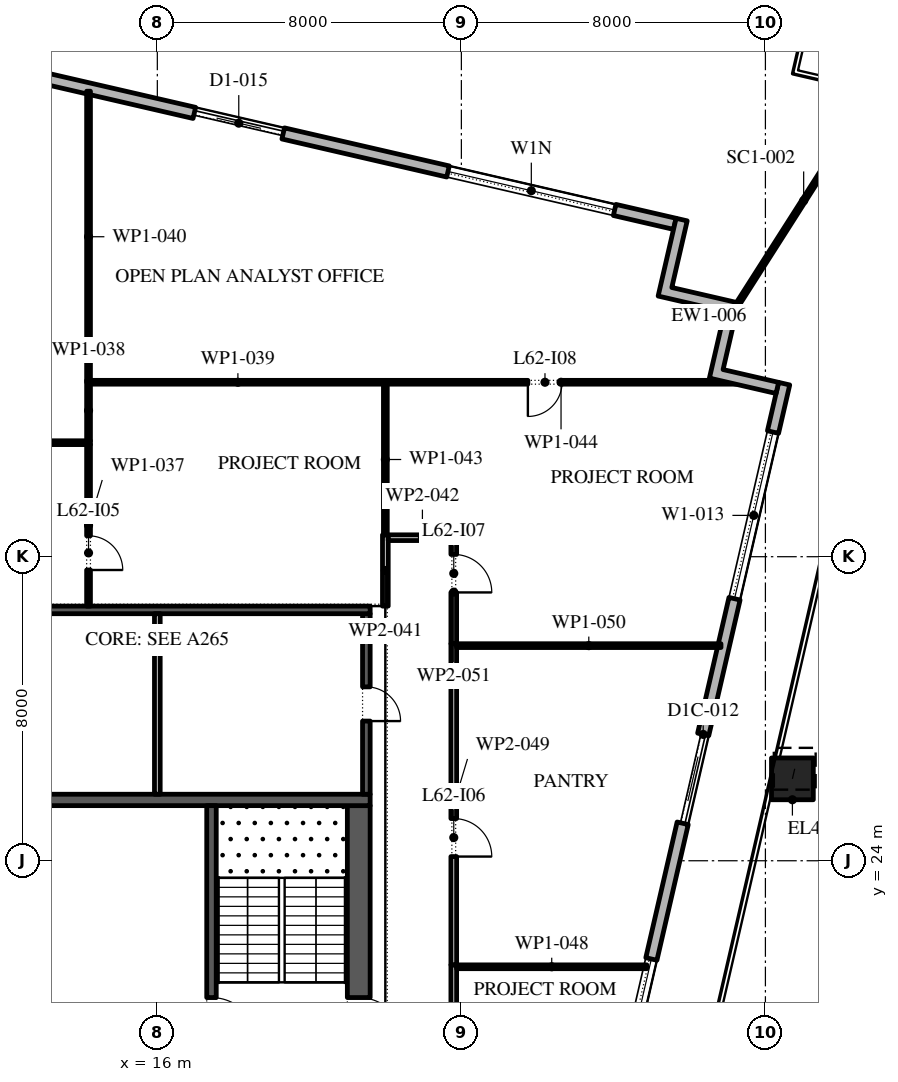
"""IFC4 building model, lengths in metres.
Left out: names, types, materials, properties, quantities, classifications, styles, units other than length and angle.
Written with IfcOpenShell. Run it as: python <this file> out.ifc"""

import sys

from ifc_helpers import new_model, si_unit, direction, frame, frame_2d, origin, origin_2d, place, context, subcontext, project, spatial, polyline, rectangle, outline, extrude, element, fill, save


model = new_model("IFC4")
c1 = context("Model", 3, precision=1e-05, world=origin(), true_north=direction((0.0, 1.0)))
c2 = subcontext(c1, "Body", "Model", "MODEL_VIEW")
j1 = project(units=[si_unit("LENGTHUNIT", "METRE"), si_unit("PLANEANGLEUNIT", "RADIAN")], contexts=[c1])
p1 = place(None, origin())
s1 = spatial("IfcSite", under=j1, at=p1, CompositionType="ELEMENT")
p2 = place(p1, origin())
s2 = spatial("IfcBuilding", under=s1, at=p2, CompositionType="ELEMENT")
p3 = place(p2, frame((0.0, 0.0, 285.0)))
s3 = spatial("IfcBuildingStorey", under=s2, at=p3, CompositionType="ELEMENT", Elevation=285.0)
p4 = place(p3, frame((32.71, 26.155, 0.0), z_axis=(0.014617783326, 0.063169706518, 0.99789574034), x_axis=(-0.974255315496, 0.225447511024, 0.0)))
e1 = element("IfcColumn", 1, at=p4, inside=s3, PredefinedType="COLUMN", context=c2, shape_type="SweptSolid", body=[
    extrude(rectangle(XDim=1.1, YDim=1.1, at=origin_2d()), origin(), (0.0, 0.0, 1.0), 4.209),
])
p5 = place(p3, frame((21.359, -11.678, 0.0), z_axis=(0.0, 0.0, 1.0), x_axis=(0.224949198343, 0.974370493275, 0.0)))
e2 = element("IfcWall", 2, at=p5, inside=s3, PredefinedType="STANDARD", context=c2, shape_type="SweptSolid", body=[
    extrude(rectangle(XDim=49.5, YDim=0.3, at=frame_2d((24.75, 0.0))), origin(), (0.0, 0.0, 1.0), 4.0),
])
p6 = place(p5, frame((1.157, 0.0, 0.45)))
e3 = element("IfcOpeningElement", 3, at=p6, cuts=e2, PredefinedType="OPENING", context=c2, shape_type="SweptSolid", body=[
    extrude(rectangle(XDim=4.5, YDim=3.05, at=frame_2d((2.25, 1.525))), frame((0.0, 0.16, 0.0), z_axis=(0.0, -1.0, 0.0), x_axis=(1.0, 0.0, 0.0)), (0.0, 0.0, 1.0), 0.32),
])
p7 = place(p5, frame((8.121, 0.0, 0.45)))
e4 = element("IfcOpeningElement", 4, at=p7, cuts=e2, PredefinedType="OPENING", context=c2, shape_type="SweptSolid", body=[
    extrude(rectangle(XDim=4.5, YDim=3.05, at=frame_2d((2.25, 1.525))), frame((0.0, 0.16, 0.0), z_axis=(0.0, -1.0, 0.0), x_axis=(1.0, 0.0, 0.0)), (0.0, 0.0, 1.0), 0.32),
])
p8 = place(p5, frame((15.236, 0.0, 0.45)))
e5 = element("IfcOpeningElement", 5, at=p8, cuts=e2, PredefinedType="OPENING", context=c2, shape_type="SweptSolid", body=[
    extrude(rectangle(XDim=4.5, YDim=3.05, at=frame_2d((2.25, 1.525))), frame((0.0, 0.16, 0.0), z_axis=(0.0, -1.0, 0.0), x_axis=(1.0, 0.0, 0.0)), (0.0, 0.0, 1.0), 0.32),
])
p9 = place(p5, frame((22.35, 0.0, 0.45)))
e6 = element("IfcOpeningElement", 6, at=p9, cuts=e2, PredefinedType="OPENING", context=c2, shape_type="SweptSolid", body=[
    extrude(rectangle(XDim=4.5, YDim=3.05, at=frame_2d((2.25, 1.525))), frame((0.0, 0.16, 0.0), z_axis=(0.0, -1.0, 0.0), x_axis=(1.0, 0.0, 0.0)), (0.0, 0.0, 1.0), 0.32),
])
p10 = place(p5, frame((29.464, 0.0, 0.45)))
e7 = element("IfcOpeningElement", 7, at=p10, cuts=e2, PredefinedType="OPENING", context=c2, shape_type="SweptSolid", body=[
    extrude(rectangle(XDim=4.5, YDim=2.95, at=frame_2d((2.25, 1.475))), frame((0.0, 0.16, 0.0), z_axis=(0.0, -1.0, 0.0), x_axis=(1.0, 0.0, 0.0)), (0.0, 0.0, 1.0), 0.32),
])
p11 = place(p5, frame((37.628, 0.0, 0.0)))
e8 = element("IfcOpeningElement", 8, at=p11, cuts=e2, PredefinedType="OPENING", context=c2, shape_type="SweptSolid", body=[
    extrude(rectangle(XDim=2.4, YDim=3.325, at=frame_2d((1.2, 1.663))), frame((0.0, 0.16, 0.0), z_axis=(0.0, -1.0, 0.0), x_axis=(1.0, 0.0, 0.0)), (0.0, 0.0, 1.0), 0.32),
])
p12 = place(p5, frame((43.693, 0.0, 0.45)))
e9 = element("IfcOpeningElement", 9, at=p12, cuts=e2, PredefinedType="OPENING", context=c2, shape_type="SweptSolid", body=[
    extrude(rectangle(XDim=4.5, YDim=3.05, at=frame_2d((2.25, 1.525))), frame((0.0, 0.16, 0.0), z_axis=(0.0, -1.0, 0.0), x_axis=(1.0, 0.0, 0.0)), (0.0, 0.0, 1.0), 0.32),
])
p13 = place(p3, frame((29.616, 40.758, 0.0), z_axis=(0.0, 0.0, 1.0), x_axis=(-0.974370532314, 0.224949029246, 0.0)))
e10 = element("IfcWall", 10, at=p13, inside=s3, PredefinedType="STANDARD", context=c2, shape_type="SweptSolid", body=[
    extrude(rectangle(XDim=48.0, YDim=0.3, at=frame_2d((24.0, 0.0))), origin(), (0.0, 0.0, 1.0), 4.0),
])
p14 = place(p13, frame((1.625, 0.0, 0.45)))
e11 = element("IfcOpeningElement", 11, at=p14, cuts=e10, PredefinedType="OPENING", context=c2, shape_type="SweptSolid", body=[
    extrude(rectangle(XDim=4.5, YDim=2.525, at=frame_2d((2.25, 1.262))), frame((0.0, 0.16, 0.0), z_axis=(0.0, -1.0, 0.0), x_axis=(1.0, 0.0, 0.0)), (0.0, 0.0, 1.0), 0.32),
])
p15 = place(p13, frame((10.575, 0.0, 0.0)))
e12 = element("IfcOpeningElement", 12, at=p15, cuts=e10, PredefinedType="OPENING", context=c2, shape_type="SweptSolid", body=[
    extrude(rectangle(XDim=2.4, YDim=3.5, at=frame_2d((1.2, 1.75))), frame((0.0, 0.16, 0.0), z_axis=(0.0, -1.0, 0.0), x_axis=(1.0, 0.0, 0.0)), (0.0, 0.0, 1.0), 0.32),
])
p16 = place(p13, frame((17.575, 0.0, 0.45)))
e13 = element("IfcOpeningElement", 13, at=p16, cuts=e10, PredefinedType="OPENING", context=c2, shape_type="SweptSolid", body=[
    extrude(rectangle(XDim=4.5, YDim=2.45, at=frame_2d((2.25, 1.225))), frame((0.0, 0.16, 0.0), z_axis=(0.0, -1.0, 0.0), x_axis=(1.0, 0.0, 0.0)), (0.0, 0.0, 1.0), 0.32),
])
p17 = place(p13, frame((25.625, 0.0, 0.45)))
e14 = element("IfcOpeningElement", 14, at=p17, cuts=e10, PredefinedType="OPENING", context=c2, shape_type="SweptSolid", body=[
    extrude(rectangle(XDim=4.5, YDim=2.45, at=frame_2d((2.25, 1.225))), frame((0.0, 0.16, 0.0), z_axis=(0.0, -1.0, 0.0), x_axis=(1.0, 0.0, 0.0)), (0.0, 0.0, 1.0), 0.32),
])
p18 = place(p13, frame((33.675, 0.0, 0.45)))
e15 = element("IfcOpeningElement", 15, at=p18, cuts=e10, PredefinedType="OPENING", context=c2, shape_type="SweptSolid", body=[
    extrude(rectangle(XDim=4.5, YDim=2.45, at=frame_2d((2.25, 1.225))), frame((0.0, 0.16, 0.0), z_axis=(0.0, -1.0, 0.0), x_axis=(1.0, 0.0, 0.0)), (0.0, 0.0, 1.0), 0.32),
])
p19 = place(p13, frame((42.775, 0.0, 0.0)))
e16 = element("IfcOpeningElement", 16, at=p19, cuts=e10, PredefinedType="OPENING", context=c2, shape_type="SweptSolid", body=[
    extrude(rectangle(XDim=2.4, YDim=3.5, at=frame_2d((1.2, 1.75))), frame((0.0, 0.16, 0.0), z_axis=(0.0, -1.0, 0.0), x_axis=(1.0, 0.0, 0.0)), (0.0, 0.0, 1.0), 0.32),
])
p20 = place(p3, origin())
e17 = element("IfcWall", 17, at=p20, inside=s3, PredefinedType="STANDARD", context=c2, shape_type="SweptSolid", body=[
    extrude(outline(polyline([(30.931, 38.453), (29.177, 38.858), (29.65, 40.905), (29.942, 40.837), (29.537, 39.083), (31.291, 38.678), (30.886, 36.924), (32.348, 36.587), (32.28, 36.295), (30.526, 36.699), (30.931, 38.453)])), origin(), (0.0, 0.0, 1.0), 4.0),
])
p21 = place(p3, frame((31.291, 38.678, -0.05), z_axis=(0.0, 0.0, 1.0), x_axis=(0.537850870221, 0.843039999883, 0.0)))
e18 = element("IfcWall", 18, at=p21, inside=s3, PredefinedType="STANDARD", context=c2, shape_type="SweptSolid", body=[
    extrude(rectangle(XDim=6.379, YDim=0.1, at=frame_2d((3.189, 0.0))), origin(), (0.0, 0.0, 1.0), 4.05),
])
p22 = place(p3, frame((21.3, -2.45, 0.0), z_axis=(0.0, 0.0, 1.0), x_axis=(0.0, 1.0, 0.0)))
e19 = element("IfcWall", 19, at=p22, inside=s3, PredefinedType="SHEAR", context=c2, shape_type="SweptSolid", body=[
    extrude(rectangle(XDim=27.9, YDim=0.6, at=frame_2d((13.95, 0.0))), origin(), (0.0, 0.0, 1.0), 4.0),
])
p23 = place(p22, frame((5.05, 0.0, 0.0)))
e20 = element("IfcOpeningElement", 20, at=p23, cuts=e19, PredefinedType="OPENING", context=c2, shape_type="SweptSolid", body=[
    extrude(rectangle(XDim=1.2, YDim=2.1, at=frame_2d((0.6, 1.05))), frame((0.0, 0.31, 0.0), z_axis=(0.0, -1.0, 0.0), x_axis=(1.0, 0.0, 0.0)), (0.0, 0.0, 1.0), 0.62),
])
p24 = place(p22, frame((21.65, 0.0, 0.0)))
e21 = element("IfcOpeningElement", 21, at=p24, cuts=e19, PredefinedType="OPENING", context=c2, shape_type="SweptSolid", body=[
    extrude(rectangle(XDim=1.2, YDim=2.1, at=frame_2d((0.6, 1.05))), frame((0.0, 0.31, 0.0), z_axis=(0.0, -1.0, 0.0), x_axis=(1.0, 0.0, 0.0)), (0.0, 0.0, 1.0), 0.62),
])
p25 = place(p3, frame((10.4, 25.6, 0.0), z_axis=(0.0, 0.0, 1.0), x_axis=(1.0, 0.0, 0.0)))
e22 = element("IfcWall", 22, at=p25, inside=s3, PredefinedType="SHEAR", context=c2, shape_type="SweptSolid", body=[
    extrude(rectangle(XDim=11.2, YDim=0.3, at=frame_2d((5.6, 0.0))), origin(), (0.0, 0.0, 1.0), 4.0),
])
p26 = place(p3, frame((17.425, 19.15, 0.0), z_axis=(0.0, 0.0, 1.0), x_axis=(0.0, 1.0, 0.0)))
e23 = element("IfcWall", 23, at=p26, inside=s3, PredefinedType="SHEAR", context=c2, shape_type="SweptSolid", body=[
    extrude(rectangle(XDim=6.3, YDim=0.25, at=frame_2d((3.15, 0.0))), origin(), (0.0, 0.0, 1.0), 4.0),
])
p27 = place(p26, frame((0.05, 0.0, 0.0)))
e24 = element("IfcOpeningElement", 24, at=p27, cuts=e23, PredefinedType="OPENING", context=c2, shape_type="SweptSolid", body=[
    extrude(rectangle(XDim=1.2, YDim=2.1, at=frame_2d((0.6, 1.05))), frame((0.0, 0.135, 0.0), z_axis=(0.0, -1.0, 0.0), x_axis=(1.0, 0.0, 0.0)), (0.0, 0.0, 1.0), 0.27),
])
p28 = place(p3, frame((21.5, 25.75, 0.0), z_axis=(0.0, 0.0, 1.0), x_axis=(0.0, 1.0, 0.0)))
e25 = element("IfcWall", 25, at=p28, inside=s3, PredefinedType="SHEAR", context=c2, shape_type="SweptSolid", body=[
    extrude(rectangle(XDim=4.75, YDim=0.2, at=frame_2d((2.375, 0.0))), origin(), (0.0, 0.0, 1.0), 4.0),
])
p29 = place(p28, frame((1.925, 0.0, 0.0)))
e26 = element("IfcOpeningElement", 26, at=p29, cuts=e25, PredefinedType="OPENING", context=c2, shape_type="SweptSolid", body=[
    extrude(rectangle(XDim=0.9, YDim=2.1, at=frame_2d((0.45, 1.05))), frame((0.0, 0.11, 0.0), z_axis=(0.0, -1.0, 0.0), x_axis=(1.0, 0.0, 0.0)), (0.0, 0.0, 1.0), 0.22),
])
p30 = place(p3, frame((10.4, 30.6, 0.0), z_axis=(0.0, 0.0, 1.0), x_axis=(1.0, 0.0, 0.0)))
e27 = element("IfcWall", 27, at=p30, inside=s3, PredefinedType="SHEAR", context=c2, shape_type="SweptSolid", body=[
    extrude(rectangle(XDim=11.2, YDim=0.2, at=frame_2d((5.6, 0.0))), origin(), (0.0, 0.0, 1.0), 4.0),
])
p31 = place(p3, frame((16.0, 25.75, 0.0), z_axis=(0.0, 0.0, 1.0), x_axis=(0.0, 1.0, 0.0)))
e28 = element("IfcWall", 28, at=p31, inside=s3, PredefinedType="PARTITIONING", context=c2, shape_type="SweptSolid", body=[
    extrude(rectangle(XDim=4.75, YDim=0.15, at=frame_2d((2.375, 0.0))), origin(), (0.0, 0.0, 1.0), 4.0),
])
p32 = place(p3, frame((14.24, 35.0, 0.0), z_axis=(0.0, 0.0, 1.0), x_axis=(-1.0, 0.0, 0.0)))
e29 = element("IfcWall", 29, at=p32, inside=s3, PredefinedType="PARTITIONING", context=c2, shape_type="SweptSolid", body=[
    extrude(rectangle(XDim=13.175, YDim=0.1, at=frame_2d((6.587, 0.0))), origin(), (0.0, 0.0, 1.0), 4.0),
])
p33 = place(p3, frame((14.19, 34.95, 0.0), z_axis=(0.0, 0.0, 1.0), x_axis=(0.0, -1.0, 0.0)))
e30 = element("IfcWall", 30, at=p33, inside=s3, PredefinedType="PARTITIONING", context=c2, shape_type="SweptSolid", body=[
    extrude(rectangle(XDim=4.25, YDim=0.1, at=frame_2d((2.125, 0.0))), origin(), (0.0, 0.0, 1.0), 4.0),
])
p34 = place(p33, frame((2.4, 0.0, 0.0)))
e31 = element("IfcOpeningElement", 31, at=p34, cuts=e30, PredefinedType="OPENING", context=c2, shape_type="SweptSolid", body=[
    extrude(rectangle(XDim=0.9, YDim=2.1, at=frame_2d((0.45, 1.05))), frame((0.0, 0.06, 0.0), z_axis=(0.0, -1.0, 0.0), x_axis=(1.0, 0.0, 0.0)), (0.0, 0.0, 1.0), 0.12),
])
p35 = place(p3, frame((14.19, 36.64, 0.0), z_axis=(0.0, 0.0, 1.0), x_axis=(0.0, -1.0, 0.0)))
e32 = element("IfcWall", 32, at=p35, inside=s3, PredefinedType="PARTITIONING", context=c2, shape_type="SweptSolid", body=[
    extrude(rectangle(XDim=1.59, YDim=0.1, at=frame_2d((0.795, 0.0))), origin(), (0.0, 0.0, 1.0), 4.0),
])
p36 = place(p3, frame((14.24, 36.59, 0.0), z_axis=(0.0, 0.0, 1.0), x_axis=(1.0, 0.0, 0.0)))
e33 = element("IfcWall", 33, at=p36, inside=s3, PredefinedType="PARTITIONING", context=c2, shape_type="SweptSolid", body=[
    extrude(rectangle(XDim=7.76, YDim=0.1, at=frame_2d((3.88, 0.0))), origin(), (0.0, 0.0, 1.0), 4.0),
])
p37 = place(p3, frame((14.19, 44.248, 0.0), z_axis=(0.0, 0.0, 1.0), x_axis=(0.0, -1.0, 0.0)))
e34 = element("IfcWall", 34, at=p37, inside=s3, PredefinedType="PARTITIONING", context=c2, shape_type="SweptSolid", body=[
    extrude(rectangle(XDim=7.658, YDim=0.1, at=frame_2d((3.829, 0.0))), origin(), (0.0, 0.0, 1.0), 4.0),
])
p38 = place(p3, frame((22.0, 30.7, 0.0), z_axis=(0.0, 0.0, 1.0), x_axis=(0.0, 1.0, 0.0)))
e35 = element("IfcWall", 35, at=p38, inside=s3, PredefinedType="PARTITIONING", context=c2, shape_type="SweptSolid", body=[
    extrude(rectangle(XDim=1.875, YDim=0.15, at=frame_2d((0.938, 0.0))), origin(), (0.0, 0.0, 1.0), 4.0),
])
p39 = place(p3, frame((22.075, 32.5, 0.0), z_axis=(0.0, 0.0, 1.0), x_axis=(1.0, 0.0, 0.0)))
e36 = element("IfcWall", 36, at=p39, inside=s3, PredefinedType="PARTITIONING", context=c2, shape_type="SweptSolid", body=[
    extrude(rectangle(XDim=1.8, YDim=0.15, at=frame_2d((0.9, 0.0))), origin(), (0.0, 0.0, 1.0), 4.0),
])
p40 = place(p3, frame((22.0, 36.54, 0.0), z_axis=(0.0, 0.0, 1.0), x_axis=(0.0, -1.0, 0.0)))
e37 = element("IfcWall", 37, at=p40, inside=s3, PredefinedType="PARTITIONING", context=c2, shape_type="SweptSolid", body=[
    extrude(rectangle(XDim=3.965, YDim=0.1, at=frame_2d((1.982, 0.0))), origin(), (0.0, 0.0, 1.0), 4.0),
])
p41 = place(p3, frame((22.0, 36.59, 0.0), z_axis=(0.0, 0.0, 1.0), x_axis=(1.0, 0.0, 0.0)))
e38 = element("IfcWall", 38, at=p41, inside=s3, PredefinedType="PARTITIONING", context=c2, shape_type="SweptSolid", body=[
    extrude(rectangle(XDim=9.245, YDim=0.1, at=frame_2d((4.623, 0.0))), origin(), (0.0, 0.0, 1.0), 4.0),
])
p42 = place(p41, frame((3.75, 0.0, 0.0)))
e39 = element("IfcOpeningElement", 39, at=p42, cuts=e38, PredefinedType="OPENING", context=c2, shape_type="SweptSolid", body=[
    extrude(rectangle(XDim=0.9, YDim=2.1, at=frame_2d((0.45, 1.05))), frame((0.0, 0.06, 0.0), z_axis=(0.0, -1.0, 0.0), x_axis=(1.0, 0.0, 0.0)), (0.0, 0.0, 1.0), 0.12),
])
p43 = place(p3, frame((23.8, 21.26, 0.0), z_axis=(0.0, 0.0, 1.0), x_axis=(0.0, -1.0, 0.0)))
e40 = element("IfcWall", 40, at=p43, inside=s3, PredefinedType="PARTITIONING", context=c2, shape_type="SweptSolid", body=[
    extrude(rectangle(XDim=18.325, YDim=0.15, at=frame_2d((9.163, 0.0))), origin(), (0.0, 0.0, 1.0), 4.0),
])
p44 = place(p43, frame((5.0, 0.0, 0.0)))
e41 = element("IfcOpeningElement", 41, at=p44, cuts=e40, PredefinedType="OPENING", context=c2, shape_type="SweptSolid", body=[
    extrude(rectangle(XDim=1.0, YDim=2.1, at=frame_2d((0.5, 1.05))), frame((0.0, 0.085, 0.0), z_axis=(0.0, -1.0, 0.0), x_axis=(1.0, 0.0, 0.0)), (0.0, 0.0, 1.0), 0.17),
])
p45 = place(p3, frame((23.875, 21.21, 0.0), z_axis=(0.0, 0.0, 1.0), x_axis=(1.0, 0.0, 0.0)))
e42 = element("IfcWall", 42, at=p45, inside=s3, PredefinedType="PARTITIONING", context=c2, shape_type="SweptSolid", body=[
    extrude(rectangle(XDim=5.005, YDim=0.1, at=frame_2d((2.502, 0.0))), origin(), (0.0, 0.0, 1.0), 4.0),
])
p46 = place(p3, frame((23.8, 29.71, 0.0), z_axis=(0.0, 0.0, 1.0), x_axis=(0.0, -1.0, 0.0)))
e43 = element("IfcWall", 43, at=p46, inside=s3, PredefinedType="PARTITIONING", context=c2, shape_type="SweptSolid", body=[
    extrude(rectangle(XDim=8.45, YDim=0.15, at=frame_2d((4.225, 0.0))), origin(), (0.0, 0.0, 1.0), 4.0),
])
p47 = place(p46, frame((4.6, 0.0, 0.0)))
e44 = element("IfcOpeningElement", 44, at=p47, cuts=e43, PredefinedType="OPENING", context=c2, shape_type="SweptSolid", body=[
    extrude(rectangle(XDim=1.0, YDim=2.1, at=frame_2d((0.5, 1.05))), frame((0.0, 0.085, 0.0), z_axis=(0.0, -1.0, 0.0), x_axis=(1.0, 0.0, 0.0)), (0.0, 0.0, 1.0), 0.17),
])
p48 = place(p3, frame((23.875, 29.66, 0.0), z_axis=(0.0, 0.0, 1.0), x_axis=(1.0, 0.0, 0.0)))
e45 = element("IfcWall", 45, at=p48, inside=s3, PredefinedType="PARTITIONING", context=c2, shape_type="SweptSolid", body=[
    extrude(rectangle(XDim=6.956, YDim=0.1, at=frame_2d((3.478, 0.0))), origin(), (0.0, 0.0, 1.0), 4.0),
])
p49 = place(p3, frame((23.8, 32.425, 0.0), z_axis=(0.0, 0.0, 1.0), x_axis=(0.0, -1.0, 0.0)))
e46 = element("IfcWall", 46, at=p49, inside=s3, PredefinedType="PARTITIONING", context=c2, shape_type="SweptSolid", body=[
    extrude(rectangle(XDim=2.715, YDim=0.15, at=frame_2d((1.357, 0.0))), origin(), (0.0, 0.0, 1.0), 4.0),
])
p50 = place(p49, frame((0.365, 0.0, 0.0)))
e47 = element("IfcOpeningElement", 47, at=p50, cuts=e46, PredefinedType="OPENING", context=c2, shape_type="SweptSolid", body=[
    extrude(rectangle(XDim=1.0, YDim=2.1, at=frame_2d((0.5, 1.05))), frame((0.0, 0.085, 0.0), z_axis=(0.0, -1.0, 0.0), x_axis=(1.0, 0.0, 0.0)), (0.0, 0.0, 1.0), 0.17),
])
p51 = place(p10, origin())
e48 = element("IfcWindow", 48, at=p51, inside=s3, PartitioningType="DOUBLE_PANEL_VERTICAL", PredefinedType="WINDOW", context=c2, shape_type="SweptSolid", body=[
    extrude(rectangle(XDim=4.5, YDim=2.95, at=frame_2d((2.25, 1.475))), frame((0.0, 0.03, 0.0), z_axis=(0.0, -1.0, 0.0), x_axis=(1.0, 0.0, 0.0)), (0.0, 0.0, 1.0), 0.06),
])
fill(e7, e48)
p52 = place(p11, origin())
e49 = element("IfcDoor", 49, at=p52, inside=s3, OperationType="DOUBLE_DOOR_SLIDING", PredefinedType="DOOR", context=c2, shape_type="SweptSolid", body=[
    extrude(rectangle(XDim=2.4, YDim=3.325, at=frame_2d((1.2, 1.663))), frame((0.0, 0.025, 0.0), z_axis=(0.0, -1.0, 0.0), x_axis=(1.0, 0.0, 0.0)), (0.0, 0.0, 1.0), 0.05),
])
fill(e8, e49)
p53 = place(p12, origin())
e50 = element("IfcWindow", 50, at=p53, inside=s3, PartitioningType="DOUBLE_PANEL_VERTICAL", PredefinedType="WINDOW", context=c2, shape_type="SweptSolid", body=[
    extrude(rectangle(XDim=4.5, YDim=3.05, at=frame_2d((2.25, 1.525))), frame((0.0, 0.03, 0.0), z_axis=(0.0, -1.0, 0.0), x_axis=(1.0, 0.0, 0.0)), (0.0, 0.0, 1.0), 0.06),
])
fill(e9, e50)
p54 = place(p14, origin())
e51 = element("IfcWindow", 51, at=p54, inside=s3, PartitioningType="DOUBLE_PANEL_VERTICAL", PredefinedType="WINDOW", context=c2, shape_type="SweptSolid", body=[
    extrude(rectangle(XDim=4.5, YDim=2.525, at=frame_2d((2.25, 1.262))), frame((0.0, 0.03, 0.0), z_axis=(0.0, -1.0, 0.0), x_axis=(1.0, 0.0, 0.0)), (0.0, 0.0, 1.0), 0.06),
])
fill(e11, e51)
p55 = place(p15, origin())
e52 = element("IfcDoor", 52, at=p55, inside=s3, OperationType="DOUBLE_DOOR_SLIDING", PredefinedType="DOOR", context=c2, shape_type="SweptSolid", body=[
    extrude(rectangle(XDim=2.4, YDim=3.5, at=frame_2d((1.2, 1.75))), frame((0.0, 0.025, 0.0), z_axis=(0.0, -1.0, 0.0), x_axis=(1.0, 0.0, 0.0)), (0.0, 0.0, 1.0), 0.05),
])
fill(e12, e52)
p56 = place(p27, frame((1.2, 0.0, 0.0), z_axis=(0.0, 0.0, 1.0), x_axis=(-1.0, 0.0, 0.0)))
e53 = element("IfcDoor", 53, at=p56, inside=s3, OperationType="SINGLE_SWING_LEFT", PredefinedType="DOOR", context=c2, shape_type="SweptSolid", body=[
    extrude(rectangle(XDim=1.2, YDim=2.1, at=frame_2d((0.6, 1.05))), frame((0.0, 0.025, 0.0), z_axis=(0.0, -1.0, 0.0), x_axis=(1.0, 0.0, 0.0)), (0.0, 0.0, 1.0), 0.05),
])
fill(e24, e53)
p57 = place(p24, frame((1.2, 0.0, 0.0), z_axis=(0.0, 0.0, 1.0), x_axis=(-1.0, 0.0, 0.0)))
e54 = element("IfcDoor", 54, at=p57, inside=s3, OperationType="SINGLE_SWING_LEFT", PredefinedType="DOOR", context=c2, shape_type="SweptSolid", body=[
    extrude(rectangle(XDim=1.2, YDim=2.1, at=frame_2d((0.6, 1.05))), frame((0.0, 0.025, 0.0), z_axis=(0.0, -1.0, 0.0), x_axis=(1.0, 0.0, 0.0)), (0.0, 0.0, 1.0), 0.05),
])
fill(e21, e54)
p58 = place(p29, frame((0.9, 0.15, 0.0), z_axis=(0.0, 0.0, 1.0), x_axis=(-1.0, 0.0, 0.0)))
e55 = element("IfcDoor", 55, at=p58, inside=s3, OperationType="SINGLE_SWING_LEFT", PredefinedType="DOOR", context=c2, shape_type="SweptSolid", body=[
    extrude(rectangle(XDim=0.9, YDim=2.1, at=frame_2d((0.45, 1.05))), frame((0.0, 0.1, 0.0), z_axis=(0.0, -1.0, 0.0), x_axis=(1.0, 0.0, 0.0)), (0.0, 0.0, 1.0), 0.05),
])
fill(e26, e55)
p59 = place(p34, origin())
e56 = element("IfcDoor", 56, at=p59, inside=s3, OperationType="SINGLE_SWING_LEFT", PredefinedType="DOOR", context=c2, shape_type="SweptSolid", body=[
    extrude(rectangle(XDim=0.9, YDim=2.1, at=frame_2d((0.45, 1.05))), frame((0.0, 0.025, 0.0), z_axis=(0.0, -1.0, 0.0), x_axis=(1.0, 0.0, 0.0)), (0.0, 0.0, 1.0), 0.05),
])
fill(e31, e56)
p60 = place(p47, origin())
e57 = element("IfcDoor", 57, at=p60, inside=s3, OperationType="SINGLE_SWING_LEFT", PredefinedType="DOOR", context=c2, shape_type="SweptSolid", body=[
    extrude(rectangle(XDim=1.0, YDim=2.1, at=frame_2d((0.5, 1.05))), frame((0.0, 0.025, 0.0), z_axis=(0.0, -1.0, 0.0), x_axis=(1.0, 0.0, 0.0)), (0.0, 0.0, 1.0), 0.05),
])
fill(e44, e57)
p61 = place(p50, origin())
e58 = element("IfcDoor", 58, at=p61, inside=s3, OperationType="SINGLE_SWING_LEFT", PredefinedType="DOOR", context=c2, shape_type="SweptSolid", body=[
    extrude(rectangle(XDim=1.0, YDim=2.1, at=frame_2d((0.5, 1.05))), frame((0.0, 0.025, 0.0), z_axis=(0.0, -1.0, 0.0), x_axis=(1.0, 0.0, 0.0)), (0.0, 0.0, 1.0), 0.05),
])
fill(e47, e58)
p62 = place(p42, frame((0.9, 0.0, 0.0), z_axis=(0.0, 0.0, 1.0), x_axis=(-1.0, 0.0, 0.0)))
e59 = element("IfcDoor", 59, at=p62, inside=s3, OperationType="SINGLE_SWING_LEFT", PredefinedType="DOOR", context=c2, shape_type="SweptSolid", body=[
    extrude(rectangle(XDim=0.9, YDim=2.1, at=frame_2d((0.45, 1.05))), frame((0.0, 0.025, 0.0), z_axis=(0.0, -1.0, 0.0), x_axis=(1.0, 0.0, 0.0)), (0.0, 0.0, 1.0), 0.05),
])
fill(e39, e59)
save(model, sys.argv[1])
